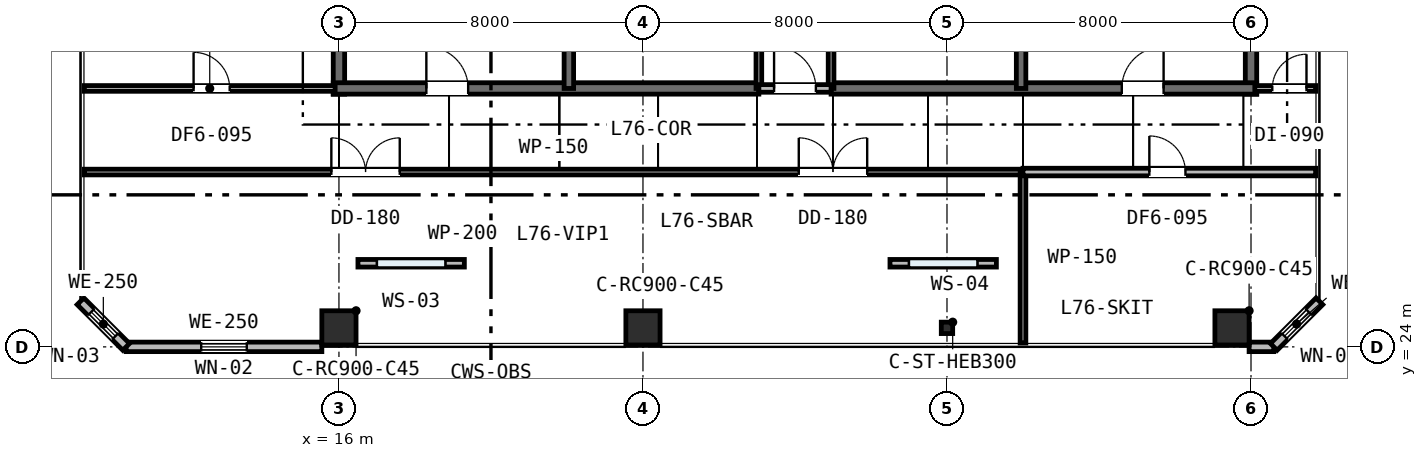
"""IFC4 building model, lengths in metres.
Left out: names, types, materials, properties, quantities, classifications, styles, units other than length and angle.
Written with IfcOpenShell. Run it as: python <this file> out.ifc"""

import sys

from ifc_helpers import new_model, si_unit, direction, frame, frame_2d, origin, origin_2d, place, context, subcontext, project, spatial, rectangle, i_section, extrude, element, fill, save


model = new_model("IFC4")
c1 = context("Model", 3, precision=1e-05, world=origin(), true_north=direction((0.0, 1.0)))
c2 = subcontext(c1, "Body", "Model", "MODEL_VIEW")
j1 = project(units=[si_unit("LENGTHUNIT", "METRE"), si_unit("PLANEANGLEUNIT", "RADIAN")], contexts=[c1])
p1 = place(None, origin())
s1 = spatial("IfcSite", under=j1, at=p1, CompositionType="ELEMENT")
p2 = place(p1, origin())
s2 = spatial("IfcBuilding", under=s1, at=p2, CompositionType="ELEMENT")
p3 = place(p2, frame((0.0, 0.0, 295.8)))
s3 = spatial("IfcBuildingStorey", under=s2, at=p3, CompositionType="ELEMENT", Elevation=295.8)
for number, where, z_axis, x_axis in (
    (1, (16.0, 30.65, 0.0), (0.0, 0.0, 1.0), (0.0, 1.0, 0.0)),
    (2, (40.0, 30.65, 0.0), (0.0, 0.0, 1.0), (0.0, 1.0, 0.0)),
):
    element("IfcWall", number, at=place(p3, frame(where, z_axis=z_axis, x_axis=x_axis)), inside=s3, PredefinedType="SHEAR", context=c2, shape_type="SweptSolid", body=[
        extrude(rectangle(XDim=12.3, YDim=0.3, at=frame_2d((6.15, 0.0))), origin(), (0.0, 0.0, 1.0), 5.2),
    ])
p4 = place(p3, frame((15.85, 30.8, 0.0), z_axis=(0.0, 0.0, 1.0), x_axis=(1.0, 0.0, 0.0)))
e3 = element("IfcWall", 3, at=p4, inside=s3, PredefinedType="SHEAR", context=c2, shape_type="SweptSolid", body=[
    extrude(rectangle(XDim=11.2, YDim=0.3, at=frame_2d((5.6, 0.0))), origin(), (0.0, 0.0, 1.0), 5.2),
])
p5 = place(p4, frame((2.45, 0.0, 0.0)))
e4 = element("IfcOpeningElement", 4, at=p5, cuts=e3, PredefinedType="OPENING", context=c2, shape_type="SweptSolid", body=[
    extrude(rectangle(XDim=1.1, YDim=2.15, at=frame_2d((0.55, 1.075))), frame((0.0, 0.16, 0.0), z_axis=(0.0, -1.0, 0.0), x_axis=(1.0, 0.0, 0.0)), (0.0, 0.0, 1.0), 0.32),
])
p6 = place(p3, frame((28.95, 30.8, 0.0), z_axis=(0.0, 0.0, 1.0), x_axis=(1.0, 0.0, 0.0)))
e5 = element("IfcWall", 5, at=p6, inside=s3, PredefinedType="SHEAR", context=c2, shape_type="SweptSolid", body=[
    extrude(rectangle(XDim=11.2, YDim=0.3, at=frame_2d((5.6, 0.0))), origin(), (0.0, 0.0, 1.0), 5.2),
])
p7 = place(p6, frame((7.65, 0.0, 0.0)))
e6 = element("IfcOpeningElement", 6, at=p7, cuts=e5, PredefinedType="OPENING", context=c2, shape_type="SweptSolid", body=[
    extrude(rectangle(XDim=1.1, YDim=2.15, at=frame_2d((0.55, 1.075))), frame((0.0, 0.16, 0.0), z_axis=(0.0, -1.0, 0.0), x_axis=(1.0, 0.0, 0.0)), (0.0, 0.0, 1.0), 0.32),
])
for number, where, z_axis, x_axis in (
    (7, (22.05, 30.8, 0.0), (0.0, 0.0, 1.0), (0.0, 1.0, 0.0)),
    (8, (33.95, 30.8, 0.0), (0.0, 0.0, 1.0), (0.0, 1.0, 0.0)),
):
    element("IfcWall", number, at=place(p3, frame(where, z_axis=z_axis, x_axis=x_axis)), inside=s3, PredefinedType="SHEAR", context=c2, shape_type="SweptSolid", body=[
        extrude(rectangle(XDim=6.45, YDim=0.25, at=frame_2d((3.225, 0.0))), origin(), (0.0, 0.0, 1.0), 5.2),
    ])
for number, where, z_axis, x_axis in (
    (9, (16.0, 24.5, 0.0), (0.0, 0.0, 1.0), (1.0, 0.0, 0.0)),
    (10, (24.0, 24.5, 0.0), (0.0, 0.0, 1.0), (1.0, 0.0, 0.0)),
):
    element("IfcColumn", number, at=place(p3, frame(where, z_axis=z_axis, x_axis=x_axis)), inside=s3, PredefinedType="COLUMN", context=c2, shape_type="SweptSolid", body=[
        extrude(rectangle(XDim=0.9, YDim=0.9, at=origin_2d()), origin(), (0.0, 0.0, 1.0), 5.2),
    ])
p8 = place(p3, frame((32.0, 24.5, 0.0), z_axis=(0.0, 0.0, 1.0), x_axis=(1.0, 0.0, 0.0)))
e11 = element("IfcColumn", 11, at=p8, inside=s3, PredefinedType="COLUMN", context=c2, shape_type="SweptSolid", body=[
    extrude(i_section(OverallWidth=0.3, OverallDepth=0.3, WebThickness=0.011, FlangeThickness=0.019, FilletRadius=0.027, at=origin_2d()), origin(), (0.0, 0.0, 1.0), 5.2),
])
p9 = place(p3, frame((39.5, 24.5, 0.0), z_axis=(0.0, 0.0, 1.0), x_axis=(1.0, 0.0, 0.0)))
e12 = element("IfcColumn", 12, at=p9, inside=s3, PredefinedType="COLUMN", context=c2, shape_type="SweptSolid", body=[
    extrude(rectangle(XDim=0.9, YDim=0.9, at=origin_2d()), origin(), (0.0, 0.0, 1.0), 5.2),
])
p10 = place(p3, frame((10.4, 24.0, 0.0), z_axis=(0.0, 0.0, 1.0), x_axis=(1.0, 0.0, 0.0)))
e13 = element("IfcWall", 13, at=p10, inside=s3, PredefinedType="STANDARD", context=c2, shape_type="SweptSolid", body=[
    extrude(rectangle(XDim=5.15, YDim=0.25, at=frame_2d((2.575, 0.0))), origin(), (0.0, 0.0, 1.0), 4.91),
])
p11 = place(p10, frame((1.975, 0.0, 0.85)))
e14 = element("IfcOpeningElement", 14, at=p11, cuts=e13, PredefinedType="OPENING", context=c2, shape_type="SweptSolid", body=[
    extrude(rectangle(XDim=1.2, YDim=1.6, at=frame_2d((0.6, 0.8))), frame((0.0, 0.135, 0.0), z_axis=(0.0, -1.0, 0.0), x_axis=(1.0, 0.0, 0.0)), (0.0, 0.0, 1.0), 0.27),
])
p12 = place(p3, frame((39.95, 24.0, 0.0), z_axis=(0.0, 0.0, 1.0), x_axis=(1.0, 0.0, 0.0)))
e15 = element("IfcWall", 15, at=p12, inside=s3, PredefinedType="STANDARD", context=c2, shape_type="SweptSolid", body=[
    extrude(rectangle(XDim=0.65, YDim=0.25, at=frame_2d((0.325, 0.0))), origin(), (0.0, 0.0, 1.0), 4.91),
])
p13 = place(p3, frame((40.6, 24.0, 0.0), z_axis=(0.0, 0.0, 1.0), x_axis=(0.707106781187, 0.707106781187, 0.0)))
e16 = element("IfcWall", 16, at=p13, inside=s3, PredefinedType="STANDARD", context=c2, shape_type="SweptSolid", body=[
    extrude(rectangle(XDim=1.697, YDim=0.25, at=frame_2d((0.849, 0.0))), origin(), (0.0, 0.0, 1.0), 4.91),
])
p14 = place(p13, frame((0.399, 0.0, 0.9)))
e17 = element("IfcOpeningElement", 17, at=p14, cuts=e16, PredefinedType="OPENING", context=c2, shape_type="SweptSolid", body=[
    extrude(rectangle(XDim=0.9, YDim=1.55, at=frame_2d((0.45, 0.775))), frame((0.0, 0.135, 0.0), z_axis=(0.0, -1.0, 0.0), x_axis=(1.0, 0.0, 0.0)), (0.0, 0.0, 1.0), 0.27),
])
p15 = place(p3, frame((9.2, 25.2, 0.0), z_axis=(0.0, 0.0, 1.0), x_axis=(0.707106781187, -0.707106781187, 0.0)))
e18 = element("IfcWall", 18, at=p15, inside=s3, PredefinedType="STANDARD", context=c2, shape_type="SweptSolid", body=[
    extrude(rectangle(XDim=1.697, YDim=0.25, at=frame_2d((0.849, 0.0))), origin(), (0.0, 0.0, 1.0), 4.91),
])
p16 = place(p15, frame((0.399, 0.0, 0.9)))
e19 = element("IfcOpeningElement", 19, at=p16, cuts=e18, PredefinedType="OPENING", context=c2, shape_type="SweptSolid", body=[
    extrude(rectangle(XDim=0.9, YDim=1.55, at=frame_2d((0.45, 0.775))), frame((0.0, 0.135, 0.0), z_axis=(0.0, -1.0, 0.0), x_axis=(1.0, 0.0, 0.0)), (0.0, 0.0, 1.0), 0.27),
])
p17 = place(p3, frame((16.5, 26.2, 0.0), z_axis=(0.0, 0.0, 1.0), x_axis=(1.0, 0.0, 0.0)))
e20 = element("IfcWall", 20, at=p17, inside=s3, PredefinedType="PARAPET", context=c2, shape_type="SweptSolid", body=[
    extrude(rectangle(XDim=2.8, YDim=0.2, at=frame_2d((1.4, 0.0))), origin(), (0.0, 0.0, 1.0), 2.4),
])
p18 = place(p17, frame((0.5, 0.0, 0.4)))
e21 = element("IfcOpeningElement", 21, at=p18, cuts=e20, PredefinedType="OPENING", context=c2, shape_type="SweptSolid", body=[
    extrude(rectangle(XDim=1.8, YDim=1.8, at=frame_2d((0.9, 0.9))), frame((0.0, 0.11, 0.0), z_axis=(0.0, -1.0, 0.0), x_axis=(1.0, 0.0, 0.0)), (0.0, 0.0, 1.0), 0.22),
])
p19 = place(p3, frame((30.5, 26.2, 0.0), z_axis=(0.0, 0.0, 1.0), x_axis=(1.0, 0.0, 0.0)))
e22 = element("IfcWall", 22, at=p19, inside=s3, PredefinedType="PARAPET", context=c2, shape_type="SweptSolid", body=[
    extrude(rectangle(XDim=2.8, YDim=0.2, at=frame_2d((1.4, 0.0))), origin(), (0.0, 0.0, 1.0), 2.4),
])
p20 = place(p19, frame((0.5, 0.0, 0.4)))
e23 = element("IfcOpeningElement", 23, at=p20, cuts=e22, PredefinedType="OPENING", context=c2, shape_type="SweptSolid", body=[
    extrude(rectangle(XDim=1.8, YDim=1.8, at=frame_2d((0.9, 0.9))), frame((0.0, 0.11, 0.0), z_axis=(0.0, -1.0, 0.0), x_axis=(1.0, 0.0, 0.0)), (0.0, 0.0, 1.0), 0.22),
])
for number, where, z_axis, x_axis in (
    (24, (27.05, 30.8, 0.0), (0.0, 0.0, 1.0), (0.0, 1.0, 0.0)),
    (25, (28.95, 30.8, 0.0), (0.0, 0.0, 1.0), (0.0, 1.0, 0.0)),
):
    element("IfcWall", number, at=place(p3, frame(where, z_axis=z_axis, x_axis=x_axis)), inside=s3, PredefinedType="PLUMBINGWALL", context=c2, shape_type="SweptSolid", body=[
        extrude(rectangle(XDim=3.45, YDim=0.15, at=frame_2d((1.725, 0.0))), origin(), (0.0, 0.0, 1.0), 4.91),
    ])
p21 = place(p3, frame((27.05, 30.8, 0.0), z_axis=(0.0, 0.0, 1.0), x_axis=(1.0, 0.0, 0.0)))
e26 = element("IfcWall", 26, at=p21, inside=s3, PredefinedType="PARTITIONING", context=c2, shape_type="SweptSolid", body=[
    extrude(rectangle(XDim=1.9, YDim=0.2, at=frame_2d((0.95, 0.0))), origin(), (0.0, 0.0, 1.0), 4.91),
])
p22 = place(p21, frame((0.4, 0.0, 0.0)))
e27 = element("IfcOpeningElement", 27, at=p22, cuts=e26, PredefinedType="OPENING", context=c2, shape_type="SweptSolid", body=[
    extrude(rectangle(XDim=1.1, YDim=2.15, at=frame_2d((0.55, 1.075))), frame((0.0, 0.11, 0.0), z_axis=(0.0, -1.0, 0.0), x_axis=(1.0, 0.0, 0.0)), (0.0, 0.0, 1.0), 0.22),
])
p23 = place(p3, frame((40.1, 30.8, 0.0), z_axis=(0.0, 0.0, 1.0), x_axis=(1.0, 0.0, 0.0)))
e28 = element("IfcWall", 28, at=p23, inside=s3, PredefinedType="PARTITIONING", context=c2, shape_type="SweptSolid", body=[
    extrude(rectangle(XDim=1.6, YDim=0.15, at=frame_2d((0.8, 0.0))), origin(), (0.0, 0.0, 1.0), 4.91),
])
p24 = place(p23, frame((0.46, 0.0, 0.0)))
e29 = element("IfcOpeningElement", 29, at=p24, cuts=e28, PredefinedType="OPENING", context=c2, shape_type="SweptSolid", body=[
    extrude(rectangle(XDim=0.9, YDim=2.15, at=frame_2d((0.45, 1.075))), frame((0.0, 0.085, 0.0), z_axis=(0.0, -1.0, 0.0), x_axis=(1.0, 0.0, 0.0)), (0.0, 0.0, 1.0), 0.17),
])
p25 = place(p3, frame((9.3, 28.6, 0.0), z_axis=(0.0, 0.0, 1.0), x_axis=(1.0, 0.0, 0.0)))
e30 = element("IfcWall", 30, at=p25, inside=s3, PredefinedType="PARTITIONING", context=c2, shape_type="SweptSolid", body=[
    extrude(rectangle(XDim=24.7, YDim=0.15, at=frame_2d((12.35, 0.0))), origin(), (0.0, 0.0, 1.0), 4.91),
])
p26 = place(p25, frame((18.8, 0.0, 0.0)))
e31 = element("IfcOpeningElement", 31, at=p26, cuts=e30, PredefinedType="OPENING", context=c2, shape_type="SweptSolid", body=[
    extrude(rectangle(XDim=1.8, YDim=2.15, at=frame_2d((0.9, 1.075))), frame((0.0, 0.085, 0.0), z_axis=(0.0, -1.0, 0.0), x_axis=(1.0, 0.0, 0.0)), (0.0, 0.0, 1.0), 0.17),
])
p27 = place(p25, frame((6.5, 0.0, 0.0)))
e32 = element("IfcOpeningElement", 32, at=p27, cuts=e30, PredefinedType="OPENING", context=c2, shape_type="SweptSolid", body=[
    extrude(rectangle(XDim=1.8, YDim=2.15, at=frame_2d((0.9, 1.075))), frame((0.0, 0.085, 0.0), z_axis=(0.0, -1.0, 0.0), x_axis=(1.0, 0.0, 0.0)), (0.0, 0.0, 1.0), 0.17),
])
p28 = place(p3, frame((34.0, 24.1, 0.0), z_axis=(0.0, 0.0, 1.0), x_axis=(0.0, 1.0, 0.0)))
e33 = element("IfcWall", 33, at=p28, inside=s3, PredefinedType="PARTITIONING", context=c2, shape_type="SweptSolid", body=[
    extrude(rectangle(XDim=4.5, YDim=0.15, at=frame_2d((2.25, 0.0))), origin(), (0.0, 0.0, 1.0), 4.91),
])
p29 = place(p3, frame((34.0, 28.6, 0.0), z_axis=(0.0, 0.0, 1.0), x_axis=(1.0, 0.0, 0.0)))
e34 = element("IfcWall", 34, at=p29, inside=s3, PredefinedType="PARTITIONING", context=c2, shape_type="SweptSolid", body=[
    extrude(rectangle(XDim=7.7, YDim=0.2, at=frame_2d((3.85, 0.0))), origin(), (0.0, 0.0, 1.0), 4.91),
])
p30 = place(p29, frame((3.325, 0.0, 0.0)))
e35 = element("IfcOpeningElement", 35, at=p30, cuts=e34, PredefinedType="OPENING", context=c2, shape_type="SweptSolid", body=[
    extrude(rectangle(XDim=0.95, YDim=2.15, at=frame_2d((0.475, 1.075))), frame((0.0, 0.11, 0.0), z_axis=(0.0, -1.0, 0.0), x_axis=(1.0, 0.0, 0.0)), (0.0, 0.0, 1.0), 0.22),
])
p31 = place(p3, frame((9.3, 30.8, 0.0), z_axis=(0.0, 0.0, 1.0), x_axis=(1.0, 0.0, 0.0)))
e36 = element("IfcWall", 36, at=p31, inside=s3, PredefinedType="PARTITIONING", context=c2, shape_type="SweptSolid", body=[
    extrude(rectangle(XDim=6.6, YDim=0.15, at=frame_2d((3.3, 0.0))), origin(), (0.0, 0.0, 1.0), 4.91),
])
p32 = place(p31, frame((2.875, 0.0, 0.0)))
e37 = element("IfcOpeningElement", 37, at=p32, cuts=e36, PredefinedType="OPENING", context=c2, shape_type="SweptSolid", body=[
    extrude(rectangle(XDim=0.95, YDim=2.15, at=frame_2d((0.475, 1.075))), frame((0.0, 0.085, 0.0), z_axis=(0.0, -1.0, 0.0), x_axis=(1.0, 0.0, 0.0)), (0.0, 0.0, 1.0), 0.17),
])
p33 = place(p11, origin())
e38 = element("IfcWindow", 38, at=p33, inside=s3, PartitioningType="SINGLE_PANEL", PredefinedType="WINDOW", context=c2, shape_type="SweptSolid", body=[
    extrude(rectangle(XDim=1.2, YDim=1.6, at=frame_2d((0.6, 0.8))), frame((0.0, 0.03, 0.0), z_axis=(0.0, -1.0, 0.0), x_axis=(1.0, 0.0, 0.0)), (0.0, 0.0, 1.0), 0.06),
])
fill(e14, e38)
p34 = place(p14, origin())
e39 = element("IfcWindow", 39, at=p34, inside=s3, PartitioningType="SINGLE_PANEL", PredefinedType="WINDOW", context=c2, shape_type="SweptSolid", body=[
    extrude(rectangle(XDim=0.9, YDim=1.55, at=frame_2d((0.45, 0.775))), frame((0.0, 0.03, 0.0), z_axis=(0.0, -1.0, 0.0), x_axis=(1.0, 0.0, 0.0)), (0.0, 0.0, 1.0), 0.06),
])
fill(e17, e39)
p35 = place(p16, origin())
e40 = element("IfcWindow", 40, at=p35, inside=s3, PartitioningType="SINGLE_PANEL", PredefinedType="WINDOW", context=c2, shape_type="SweptSolid", body=[
    extrude(rectangle(XDim=0.9, YDim=1.55, at=frame_2d((0.45, 0.775))), frame((0.0, 0.03, 0.0), z_axis=(0.0, -1.0, 0.0), x_axis=(1.0, 0.0, 0.0)), (0.0, 0.0, 1.0), 0.06),
])
fill(e19, e40)
p36 = place(p18, origin())
e41 = element("IfcWindow", 41, at=p36, inside=s3, PartitioningType="SINGLE_PANEL", PredefinedType="SKYLIGHT", context=c2, shape_type="SweptSolid", body=[
    extrude(rectangle(XDim=1.8, YDim=1.8, at=frame_2d((0.9, 0.9))), frame((0.0, 0.03, 0.0), z_axis=(0.0, -1.0, 0.0), x_axis=(1.0, 0.0, 0.0)), (0.0, 0.0, 1.0), 0.06),
])
fill(e21, e41)
p37 = place(p20, origin())
e42 = element("IfcWindow", 42, at=p37, inside=s3, PartitioningType="SINGLE_PANEL", PredefinedType="SKYLIGHT", context=c2, shape_type="SweptSolid", body=[
    extrude(rectangle(XDim=1.8, YDim=1.8, at=frame_2d((0.9, 0.9))), frame((0.0, 0.03, 0.0), z_axis=(0.0, -1.0, 0.0), x_axis=(1.0, 0.0, 0.0)), (0.0, 0.0, 1.0), 0.06),
])
fill(e23, e42)
p38 = place(p22, origin())
e43 = element("IfcDoor", 43, at=p38, inside=s3, OperationType="SINGLE_SWING_LEFT", PredefinedType="DOOR", context=c2, shape_type="SweptSolid", body=[
    extrude(rectangle(XDim=1.1, YDim=2.15, at=frame_2d((0.55, 1.075))), frame((0.0, 0.025, 0.0), z_axis=(0.0, -1.0, 0.0), x_axis=(1.0, 0.0, 0.0)), (0.0, 0.0, 1.0), 0.05),
])
fill(e27, e43)
p39 = place(p5, origin())
e44 = element("IfcDoor", 44, at=p39, inside=s3, OperationType="SINGLE_SWING_LEFT", PredefinedType="DOOR", context=c2, shape_type="SweptSolid", body=[
    extrude(rectangle(XDim=1.1, YDim=2.15, at=frame_2d((0.55, 1.075))), frame((0.0, 0.025, 0.0), z_axis=(0.0, -1.0, 0.0), x_axis=(1.0, 0.0, 0.0)), (0.0, 0.0, 1.0), 0.05),
])
fill(e4, e44)
p40 = place(p7, origin())
e45 = element("IfcDoor", 45, at=p40, inside=s3, OperationType="SINGLE_SWING_RIGHT", PredefinedType="DOOR", context=c2, shape_type="SweptSolid", body=[
    extrude(rectangle(XDim=1.1, YDim=2.15, at=frame_2d((0.55, 1.075))), frame((0.0, 0.025, 0.0), z_axis=(0.0, -1.0, 0.0), x_axis=(1.0, 0.0, 0.0)), (0.0, 0.0, 1.0), 0.05),
])
fill(e6, e45)
p41 = place(p24, origin())
e46 = element("IfcDoor", 46, at=p41, inside=s3, OperationType="SINGLE_SWING_RIGHT", PredefinedType="DOOR", context=c2, shape_type="SweptSolid", body=[
    extrude(rectangle(XDim=0.9, YDim=2.15, at=frame_2d((0.45, 1.075))), frame((0.0, 0.025, 0.0), z_axis=(0.0, -1.0, 0.0), x_axis=(1.0, 0.0, 0.0)), (0.0, 0.0, 1.0), 0.05),
])
fill(e29, e46)
p42 = place(p26, origin())
e47 = element("IfcDoor", 47, at=p42, inside=s3, OperationType="DOUBLE_DOOR_SINGLE_SWING", PredefinedType="DOOR", context=c2, shape_type="SweptSolid", body=[
    extrude(rectangle(XDim=1.8, YDim=2.15, at=frame_2d((0.9, 1.075))), frame((0.0, 0.025, 0.0), z_axis=(0.0, -1.0, 0.0), x_axis=(1.0, 0.0, 0.0)), (0.0, 0.0, 1.0), 0.05),
])
fill(e31, e47)
p43 = place(p30, origin())
e48 = element("IfcDoor", 48, at=p43, inside=s3, OperationType="SINGLE_SWING_LEFT", PredefinedType="DOOR", context=c2, shape_type="SweptSolid", body=[
    extrude(rectangle(XDim=0.95, YDim=2.15, at=frame_2d((0.475, 1.075))), frame((0.0, 0.025, 0.0), z_axis=(0.0, -1.0, 0.0), x_axis=(1.0, 0.0, 0.0)), (0.0, 0.0, 1.0), 0.05),
])
fill(e35, e48)
p44 = place(p27, origin())
e49 = element("IfcDoor", 49, at=p44, inside=s3, OperationType="DOUBLE_DOOR_SINGLE_SWING", PredefinedType="DOOR", context=c2, shape_type="SweptSolid", body=[
    extrude(rectangle(XDim=1.8, YDim=2.15, at=frame_2d((0.9, 1.075))), frame((0.0, 0.025, 0.0), z_axis=(0.0, -1.0, 0.0), x_axis=(1.0, 0.0, 0.0)), (0.0, 0.0, 1.0), 0.05),
])
fill(e32, e49)
p45 = place(p32, origin())
e50 = element("IfcDoor", 50, at=p45, inside=s3, OperationType="SINGLE_SWING_LEFT", PredefinedType="DOOR", context=c2, shape_type="SweptSolid", body=[
    extrude(rectangle(XDim=0.95, YDim=2.15, at=frame_2d((0.475, 1.075))), frame((0.0, 0.025, 0.0), z_axis=(0.0, -1.0, 0.0), x_axis=(1.0, 0.0, 0.0)), (0.0, 0.0, 1.0), 0.05),
])
fill(e37, e50)
save(model, sys.argv[1])
